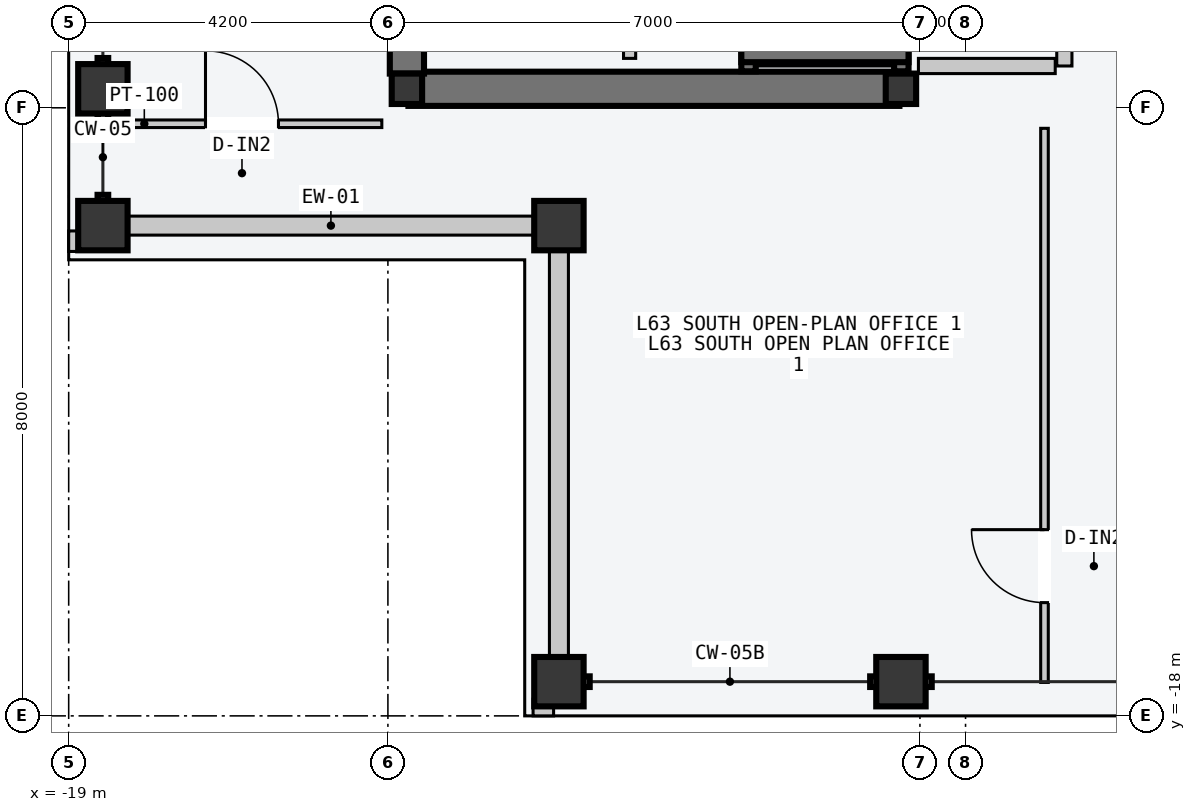
"""IFC4 building model, lengths in metres.
Left out: names, types, materials, properties, quantities, classifications, styles, units other than length and angle.
Written with IfcOpenShell. Run it as: python <this file> out.ifc"""

import sys

from ifc_helpers import new_model, si_unit, direction, frame, frame_2d, origin, origin_2d, place, context, subcontext, project, spatial, rectangle, hollow_rectangle, i_section, extrude, element, fill, save


model = new_model("IFC4")
c1 = context("Model", 3, precision=1e-05, world=origin(), true_north=direction((0.0, 1.0)))
c2 = subcontext(c1, "Body", "Model", "MODEL_VIEW")
j1 = project(units=[si_unit("LENGTHUNIT", "METRE"), si_unit("PLANEANGLEUNIT", "RADIAN")], contexts=[c1])
p1 = place(None, origin())
s1 = spatial("IfcSite", under=j1, at=p1, CompositionType="ELEMENT")
p2 = place(p1, origin())
s2 = spatial("IfcBuilding", under=s1, at=p2, CompositionType="ELEMENT")
p3 = place(p2, frame((0.0, 0.0, 240.0)))
s3 = spatial("IfcBuildingStorey", under=s2, at=p3, CompositionType="ELEMENT", Elevation=240.0)
p4 = place(p3, frame((-14.53, -9.75, -0.2), z_axis=(0.0, 0.0, 1.0), x_axis=(1.0, 0.0, 0.0)))
e1 = element("IfcWall", 1, at=p4, inside=s3, PredefinedType="SHEAR", context=c2, shape_type="SweptSolid", body=[
    extrude(rectangle(XDim=6.46, YDim=0.45, at=frame_2d((3.23, 0.0))), origin(), (0.0, 0.0, 1.0), 3.6),
])
p5 = place(p3, frame((-14.55, -9.55, -0.2), z_axis=(0.0, 0.0, 1.0), x_axis=(0.0, 1.0, 0.0)))
e2 = element("IfcWall", 2, at=p5, inside=s3, PredefinedType="SHEAR", context=c2, shape_type="SweptSolid", body=[
    extrude(rectangle(XDim=9.35, YDim=0.45, at=frame_2d((4.675, 0.0))), origin(), (0.0, 0.0, 1.0), 3.6),
])
for number, where, z_axis, x_axis in (
    (3, (-14.55, -9.75, 0.0), (0.0, 0.0, 1.0), (1.0, 0.0, 0.0)),
    (4, (-8.05, -9.75, 0.0), (0.0, 0.0, 1.0), (1.0, 0.0, 0.0)),
):
    element("IfcColumn", number, at=place(p3, frame(where, z_axis=z_axis, x_axis=x_axis)), inside=s3, PredefinedType="COLUMN", context=c2, shape_type="SweptSolid", body=[
        extrude(i_section(OverallWidth=0.4, OverallDepth=0.4, WebThickness=0.013, FlangeThickness=0.021, at=origin_2d()), origin(), (0.0, 0.0, 1.0), 3.6),
    ])
for number, where, z_axis, x_axis in (
    (5, (-12.55, -17.55, 0.0), (0.0, 0.0, 1.0), (1.0, 0.0, 0.0)),
    (6, (-8.05, -17.55, 0.0), (0.0, 0.0, 1.0), (1.0, 0.0, 0.0)),
    (7, (-18.55, -11.55, 0.0), (0.0, 0.0, 1.0), (0.0, 1.0, 0.0)),
    (8, (-18.55, -9.75, 0.0), (0.0, 0.0, 1.0), (0.0, 1.0, 0.0)),
    (9, (-12.55, -11.55, 0.0), (0.0, 0.0, 1.0), (1.0, 0.0, 0.0)),
):
    element("IfcColumn", number, at=place(p3, frame(where, z_axis=z_axis, x_axis=x_axis)), inside=s3, PredefinedType="COLUMN", context=c2, shape_type="SweptSolid", body=[
        extrude(hollow_rectangle(XDim=0.65, YDim=0.65, WallThickness=0.028, at=origin_2d()), origin(), (0.0, 0.0, 1.0), 3.6),
    ])
for number, where, z_axis, x_axis in (
    (10, (-18.215, -11.55, 0.0), (0.0, 0.0, 1.0), (1.0, 0.0, 0.0)),
    (11, (-12.55, -17.215, 0.0), (0.0, 0.0, 1.0), (0.0, 1.0, 0.0)),
):
    element("IfcWall", number, at=place(p3, frame(where, z_axis=z_axis, x_axis=x_axis)), inside=s3, PredefinedType="STANDARD", context=c2, shape_type="SweptSolid", body=[
        extrude(rectangle(XDim=5.33, YDim=0.25, at=frame_2d((2.665, 0.0))), origin(), (0.0, 0.0, 1.0), 2.85),
    ])
for number, where, z_axis, x_axis in (
    (12, (-12.89, -17.89, 0.0), (0.0, 0.0, 1.0), (1.0, 0.0, 0.0)),
    (13, (-18.89, -11.89, 0.0), (0.0, 0.0, 1.0), (0.0, 1.0, 0.0)),
):
    element("IfcWall", number, at=place(p3, frame(where, z_axis=z_axis, x_axis=x_axis)), inside=s3, PredefinedType="PARAPET", context=c2, shape_type="SweptSolid", body=[
        extrude(rectangle(XDim=0.27, YDim=0.22, at=frame_2d((0.135, 0.0))), origin(), (0.0, 0.0, 1.0), 1.2),
    ])
p6 = place(p3, frame((-8.045, -9.52, -0.2), z_axis=(0.0, 0.0, 1.0), x_axis=(0.0, 1.0, 0.0)))
e14 = element("IfcWall", 14, at=p6, inside=s3, PredefinedType="SOLIDWALL", context=c2, shape_type="SweptSolid", body=[
    extrude(rectangle(XDim=2.12, YDim=0.19, at=frame_2d((1.06, 0.0))), origin(), (0.0, 0.0, 1.0), 3.6),
])
p7 = place(p6, frame((0.57, 0.0, 0.2)))
e15 = element("IfcOpeningElement", 15, at=p7, cuts=e14, PredefinedType="OPENING", context=c2, shape_type="SweptSolid", body=[
    extrude(rectangle(XDim=1.1, YDim=2.2, at=frame_2d((0.55, 1.1))), frame((0.0, 0.105, 0.0), z_axis=(0.0, -1.0, 0.0), x_axis=(1.0, 0.0, 0.0)), (0.0, 0.0, 1.0), 0.21),
])
p8 = place(p3, frame((-10.055, -9.52, -0.2), z_axis=(0.0, 0.0, 1.0), x_axis=(0.0, 1.0, 0.0)))
e16 = element("IfcWall", 16, at=p8, inside=s3, PredefinedType="SOLIDWALL", context=c2, shape_type="SweptSolid", body=[
    extrude(rectangle(XDim=2.12, YDim=0.19, at=frame_2d((1.06, 0.0))), origin(), (0.0, 0.0, 1.0), 3.6),
])
p9 = place(p3, frame((-10.15, -9.305, -0.2), z_axis=(0.0, 0.0, 1.0), x_axis=(1.0, 0.0, 0.0)))
e17 = element("IfcWall", 17, at=p9, inside=s3, PredefinedType="SOLIDWALL", context=c2, shape_type="SweptSolid", body=[
    extrude(rectangle(XDim=2.2, YDim=0.19, at=frame_2d((1.1, 0.0))), origin(), (0.0, 0.0, 1.0), 3.6),
])
p10 = place(p3, frame((-5.9, -9.45, 0.0), z_axis=(0.0, 0.0, 1.0), x_axis=(0.0, 1.0, 0.0)))
e18 = element("IfcWall", 18, at=p10, inside=s3, PredefinedType="PARTITIONING", context=c2, shape_type="SweptSolid", body=[
    extrude(rectangle(XDim=10.5, YDim=0.2, at=frame_2d((5.25, 0.0))), origin(), (0.0, 0.0, 1.0), 3.4),
])
p11 = place(p10, frame((3.9, 0.0, 0.0)))
e19 = element("IfcOpeningElement", 19, at=p11, cuts=e18, PredefinedType="OPENING", context=c2, shape_type="SweptSolid", body=[
    extrude(rectangle(XDim=1.5, YDim=2.2, at=frame_2d((0.75, 1.1))), frame((0.0, 0.11, 0.0), z_axis=(0.0, -1.0, 0.0), x_axis=(1.0, 0.0, 0.0)), (0.0, 0.0, 1.0), 0.22),
])
p12 = place(p3, frame((-6.02, -9.45, 0.0), z_axis=(0.0, 0.0, 1.0), x_axis=(-1.0, 0.0, 0.0)))
e20 = element("IfcWall", 20, at=p12, inside=s3, PredefinedType="PARTITIONING", context=c2, shape_type="SweptSolid", body=[
    extrude(rectangle(XDim=1.8, YDim=0.2, at=frame_2d((0.9, 0.0))), origin(), (0.0, 0.0, 1.0), 3.4),
])
p13 = place(p3, frame((-11.62, -9.35, 0.0), z_axis=(0.0, 0.0, 1.0), x_axis=(0.0, 1.0, 0.0)))
e21 = element("IfcWall", 21, at=p13, inside=s3, PredefinedType="PARTITIONING", context=c2, shape_type="SweptSolid", body=[
    extrude(rectangle(XDim=3.85, YDim=0.16, at=frame_2d((1.925, 0.0))), origin(), (0.0, 0.0, 1.0), 3.4),
])
p14 = place(p13, frame((1.475, 0.0, 0.0)))
e22 = element("IfcOpeningElement", 22, at=p14, cuts=e21, PredefinedType="OPENING", context=c2, shape_type="SweptSolid", body=[
    extrude(rectangle(XDim=0.9, YDim=2.15, at=frame_2d((0.45, 1.075))), frame((0.0, 0.09, 0.0), z_axis=(0.0, -1.0, 0.0), x_axis=(1.0, 0.0, 0.0)), (0.0, 0.0, 1.0), 0.18),
])
p15 = place(p3, frame((-6.161, -17.56, 0.0), z_axis=(0.0, 0.0, 1.0), x_axis=(0.0, 1.0, 0.0)))
e23 = element("IfcWall", 23, at=p15, inside=s3, PredefinedType="PARTITIONING", context=c2, shape_type="SweptSolid", body=[
    extrude(rectangle(XDim=7.29, YDim=0.1, at=frame_2d((3.645, 0.0))), origin(), (0.0, 0.0, 1.0), 3.4),
])
p16 = place(p15, frame((1.05, 0.0, 0.0)))
e24 = element("IfcOpeningElement", 24, at=p16, cuts=e23, PredefinedType="OPENING", context=c2, shape_type="SweptSolid", body=[
    extrude(rectangle(XDim=0.96, YDim=2.18, at=frame_2d((0.48, 1.09))), frame((0.0, 0.06, 0.0), z_axis=(0.0, -1.0, 0.0), x_axis=(1.0, 0.0, 0.0)), (0.0, 0.0, 1.0), 0.12),
])
p17 = place(p3, frame((-18.56, -10.21, 0.0), z_axis=(0.0, 0.0, 1.0), x_axis=(1.0, 0.0, 0.0)))
e25 = element("IfcWall", 25, at=p17, inside=s3, PredefinedType="PARTITIONING", context=c2, shape_type="SweptSolid", body=[
    extrude(rectangle(XDim=3.68, YDim=0.1, at=frame_2d((1.84, 0.0))), origin(), (0.0, 0.0, 1.0), 3.4),
])
p18 = place(p17, frame((1.36, 0.0, 0.0)))
e26 = element("IfcOpeningElement", 26, at=p18, cuts=e25, PredefinedType="OPENING", context=c2, shape_type="SweptSolid", body=[
    extrude(rectangle(XDim=0.96, YDim=2.18, at=frame_2d((0.48, 1.09))), frame((0.0, 0.06, 0.0), z_axis=(0.0, -1.0, 0.0), x_axis=(1.0, 0.0, 0.0)), (0.0, 0.0, 1.0), 0.12),
])
p19 = place(p16, origin())
e27 = element("IfcDoor", 27, at=p19, inside=s3, OperationType="SINGLE_SWING_RIGHT", PredefinedType="DOOR", context=c2, shape_type="SweptSolid", body=[
    extrude(rectangle(XDim=0.96, YDim=2.18, at=frame_2d((0.48, 1.09))), frame((0.0, 0.025, 0.0), z_axis=(0.0, -1.0, 0.0), x_axis=(1.0, 0.0, 0.0)), (0.0, 0.0, 1.0), 0.05),
])
fill(e24, e27)
p20 = place(p18, origin())
e28 = element("IfcDoor", 28, at=p20, inside=s3, OperationType="SINGLE_SWING_LEFT", PredefinedType="DOOR", context=c2, shape_type="SweptSolid", body=[
    extrude(rectangle(XDim=0.96, YDim=2.18, at=frame_2d((0.48, 1.09))), frame((0.0, 0.025, 0.0), z_axis=(0.0, -1.0, 0.0), x_axis=(1.0, 0.0, 0.0)), (0.0, 0.0, 1.0), 0.05),
])
fill(e26, e28)
save(model, sys.argv[1])
